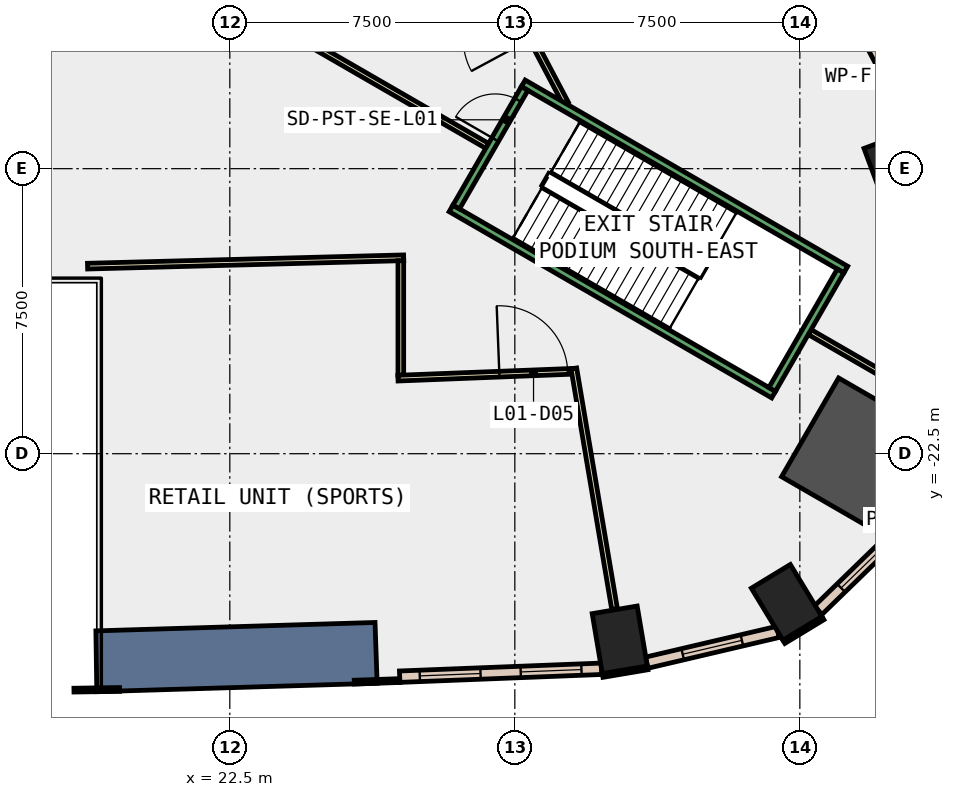
"""IFC4 building model, lengths in metres.
Left out: names, types, materials, properties, quantities, classifications, styles, units other than length and angle.
Written with IfcOpenShell. Run it as: python <this file> out.ifc"""

import sys

from ifc_helpers import new_model, si_unit, direction, frame, frame_2d, origin, origin_2d, place, context, subcontext, project, spatial, polyline, rectangle, outline, extrude, element, fill, save


model = new_model("IFC4")
c1 = context("Model", 3, precision=1e-05, world=origin(), true_north=direction((0.0, 1.0)))
c2 = subcontext(c1, "Body", "Model", "MODEL_VIEW")
j1 = project(units=[si_unit("LENGTHUNIT", "METRE"), si_unit("PLANEANGLEUNIT", "RADIAN")], contexts=[c1])
p1 = place(None, origin())
s1 = spatial("IfcSite", under=j1, at=p1, CompositionType="ELEMENT")
p2 = place(p1, origin())
s2 = spatial("IfcBuilding", under=s1, at=p2, CompositionType="ELEMENT")
p3 = place(p2, frame((0.0, 0.0, 9.0)))
s3 = spatial("IfcBuildingStorey", under=s2, at=p3, CompositionType="ELEMENT", Elevation=9.0)
for number, where, z_axis, x_axis in (
    (1, (32.761, -27.397, -0.45), (0.0, 0.0, 1.0), (0.986, 0.167, 0.0)),
    (2, (37.152, -26.411, -0.45), (0.0, 0.0, 1.0), (0.855, 0.519, 0.0)),
):
    element("IfcColumn", number, at=place(p3, frame(where, z_axis=z_axis, x_axis=x_axis)), inside=s3, PredefinedType="COLUMN", context=c2, shape_type="SweptSolid", body=[
        extrude(rectangle(XDim=1.2, YDim=1.6, at=origin_2d()), origin(), (0.0, 0.0, 1.0), 6.0),
    ])
p4 = place(p3, frame((39.069, -22.556, -0.45), z_axis=(0.0, 0.0, 1.0), x_axis=(-0.866025403784, 0.5, 0.0)))
e3 = element("IfcColumn", 3, at=p4, inside=s3, PredefinedType="COLUMN", context=c2, shape_type="SweptSolid", body=[
    extrude(rectangle(XDim=3.0, YDim=3.0, at=origin_2d()), origin(), (0.0, 0.0, 1.0), 6.0),
])
p5 = place(p3, frame((40.147, -14.751, -0.45), z_axis=(0.0, 0.0, 1.0), x_axis=(-0.348277574304, 0.937391450375, 0.0)))
e4 = element("IfcColumn", 4, at=p5, inside=s3, PredefinedType="COLUMN", context=c2, shape_type="SweptSolid", body=[
    extrude(rectangle(XDim=1.2, YDim=1.6, at=origin_2d()), origin(), (0.0, 0.0, 1.0), 6.0),
])
p6 = place(p3, frame((0.0, 0.0, -0.45)))
e5 = element("IfcWall", 5, at=p6, inside=s3, PredefinedType="SHEAR", context=c2, shape_type="SweptSolid", body=[
    extrude(outline(polyline([(19.0, -28.762), (26.377, -28.54), (26.321, -26.941), (18.976, -27.162), (19.0, -28.762)])), origin(), (0.0, 0.0, 1.0), 6.0),
])
p7 = place(p3, frame((18.399, -28.721, 0.0), z_axis=(0.0, 0.0, 1.0), x_axis=(0.999886724523, 0.015051183404, 0.0)))
e6 = element("IfcWall", 6, at=p7, inside=s3, PredefinedType="STANDARD", context=c2, shape_type="SweptSolid", body=[
    extrude(rectangle(XDim=1.2, YDim=0.1, at=frame_2d((0.6, 0.0))), origin(), (0.0, 0.0, 1.0), 5.55),
])
p8 = place(p3, frame((25.776, -28.511, 0.0), z_axis=(0.0, 0.0, 1.0), x_axis=(0.999387493042, 0.034994838926, 0.0)))
e7 = element("IfcWall", 7, at=p8, inside=s3, PredefinedType="STANDARD", context=c2, shape_type="SweptSolid", body=[
    extrude(rectangle(XDim=1.2, YDim=0.1, at=frame_2d((0.6, 0.0))), origin(), (0.0, 0.0, 1.0), 5.55),
])
p9 = place(p3, frame((32.311, -28.335, 0.0), z_axis=(0.0, 0.0, 1.0), x_axis=(0.986011774526, 0.166675674579, 0.0)))
e8 = element("IfcWall", 8, at=p9, inside=s3, PredefinedType="STANDARD", context=c2, shape_type="SweptSolid", body=[
    extrude(rectangle(XDim=1.2, YDim=0.1, at=frame_2d((0.6, 0.0))), origin(), (0.0, 0.0, 1.0), 5.55),
])
p10 = place(p3, frame((37.08, -27.449, 0.0), z_axis=(0.0, 0.0, 1.0), x_axis=(0.854716608594, 0.519094903649, 0.0)))
e9 = element("IfcWall", 9, at=p10, inside=s3, PredefinedType="STANDARD", context=c2, shape_type="SweptSolid", body=[
    extrude(rectangle(XDim=1.2, YDim=0.1, at=frame_2d((0.6, 0.0))), origin(), (0.0, 0.0, 1.0), 5.55),
])
p11 = place(p3, frame((26.97, -28.367, 0.0), z_axis=(0.0, 0.0, 1.0), x_axis=(0.999234205654, 0.039128023863, 0.0)))
e10 = element("IfcWall", 10, at=p11, inside=s3, PredefinedType="STANDARD", context=c2, shape_type="SweptSolid", body=[
    extrude(rectangle(XDim=5.316, YDim=0.3, at=frame_2d((2.658, 0.0))), origin(), (0.0, 0.0, 1.0), 5.55),
])
p12 = place(p11, frame((0.529, 0.0, 1.0)))
e11 = element("IfcOpeningElement", 11, at=p12, cuts=e10, PredefinedType="OPENING", context=c2, shape_type="SweptSolid", body=[
    extrude(rectangle(XDim=1.6, YDim=4.0, at=frame_2d((0.8, 2.0))), frame((0.0, 0.16, 0.0), z_axis=(0.0, -1.0, 0.0), x_axis=(1.0, 0.0, 0.0)), (0.0, 0.0, 1.0), 0.32),
])
p13 = place(p11, frame((3.187, 0.0, 1.0)))
e12 = element("IfcOpeningElement", 12, at=p13, cuts=e10, PredefinedType="OPENING", context=c2, shape_type="SweptSolid", body=[
    extrude(rectangle(XDim=1.6, YDim=4.0, at=frame_2d((0.8, 2.0))), frame((0.0, 0.16, 0.0), z_axis=(0.0, -1.0, 0.0), x_axis=(1.0, 0.0, 0.0)), (0.0, 0.0, 1.0), 0.32),
])
p14 = place(p3, frame((33.47, -27.999, 0.0), z_axis=(0.0, 0.0, 1.0), x_axis=(0.97357041301, 0.228387063799, 0.0)))
e13 = element("IfcWall", 13, at=p14, inside=s3, PredefinedType="STANDARD", context=c2, shape_type="SweptSolid", body=[
    extrude(rectangle(XDim=3.547, YDim=0.3, at=frame_2d((1.773, 0.0))), origin(), (0.0, 0.0, 1.0), 5.55),
])
p15 = place(p14, frame((0.973, 0.0, 1.0)))
e14 = element("IfcOpeningElement", 14, at=p15, cuts=e13, PredefinedType="OPENING", context=c2, shape_type="SweptSolid", body=[
    extrude(rectangle(XDim=1.6, YDim=4.0, at=frame_2d((0.8, 2.0))), frame((0.0, 0.16, 0.0), z_axis=(0.0, -1.0, 0.0), x_axis=(1.0, 0.0, 0.0)), (0.0, 0.0, 1.0), 0.32),
])
p16 = place(p3, frame((37.98, -26.621, 0.0), z_axis=(0.0, 0.0, 1.0), x_axis=(0.717527250225, 0.696530433782, 0.0)))
e15 = element("IfcWall", 15, at=p16, inside=s3, PredefinedType="STANDARD", context=c2, shape_type="SweptSolid", body=[
    extrude(rectangle(XDim=3.291, YDim=0.3, at=frame_2d((1.645, 0.0))), origin(), (0.0, 0.0, 1.0), 5.55),
])
p17 = place(p16, frame((0.845, 0.0, 1.0)))
e16 = element("IfcOpeningElement", 16, at=p17, cuts=e15, PredefinedType="OPENING", context=c2, shape_type="SweptSolid", body=[
    extrude(rectangle(XDim=1.6, YDim=4.0, at=frame_2d((0.8, 2.0))), frame((0.0, 0.16, 0.0), z_axis=(0.0, -1.0, 0.0), x_axis=(1.0, 0.0, 0.0)), (0.0, 0.0, 1.0), 0.32),
])
p18 = place(p3, frame((40.568, -13.956, 0.0), z_axis=(0.0, 0.0, 1.0), x_axis=(-0.466125129602, 0.884718804792, 0.0)))
e17 = element("IfcWall", 17, at=p18, inside=s3, PredefinedType="STANDARD", context=c2, shape_type="SweptSolid", body=[
    extrude(rectangle(XDim=6.164, YDim=0.3, at=frame_2d((3.082, 0.0))), origin(), (0.0, 0.0, 1.0), 5.55),
])
p19 = place(p18, frame((0.541, 0.0, 1.0)))
e18 = element("IfcOpeningElement", 18, at=p19, cuts=e17, PredefinedType="OPENING", context=c2, shape_type="SweptSolid", body=[
    extrude(rectangle(XDim=2.0, YDim=4.0, at=frame_2d((1.0, 2.0))), frame((0.0, 0.16, 0.0), z_axis=(0.0, -1.0, 0.0), x_axis=(1.0, 0.0, 0.0)), (0.0, 0.0, 1.0), 0.32),
])
p20 = place(p18, frame((3.623, 0.0, 1.0)))
e19 = element("IfcOpeningElement", 19, at=p20, cuts=e17, PredefinedType="OPENING", context=c2, shape_type="SweptSolid", body=[
    extrude(rectangle(XDim=2.0, YDim=4.0, at=frame_2d((1.0, 2.0))), frame((0.0, 0.16, 0.0), z_axis=(0.0, -1.0, 0.0), x_axis=(1.0, 0.0, 0.0)), (0.0, 0.0, 1.0), 0.32),
])
p21 = place(p3, frame((18.757, -17.565, 0.0), z_axis=(0.0, 0.0, 1.0), x_axis=(0.999650499667, 0.026436310543, 0.0)))
e20 = element("IfcWall", 20, at=p21, inside=s3, PredefinedType="PARTITIONING", context=c2, shape_type="SweptSolid", body=[
    extrude(rectangle(XDim=8.321, YDim=0.15, at=frame_2d((4.16, 0.0))), origin(), (0.0, 0.0, 1.0), 5.55),
])
p22 = place(p3, frame((27.0, -17.422, 0.0), z_axis=(0.0, 0.0, 1.0), x_axis=(0.0, -1.0, 0.0)))
e21 = element("IfcWall", 21, at=p22, inside=s3, PredefinedType="PARTITIONING", context=c2, shape_type="SweptSolid", body=[
    extrude(rectangle(XDim=3.012, YDim=0.15, at=frame_2d((1.506, 0.0))), origin(), (0.0, 0.0, 1.0), 5.55),
])
p23 = place(p3, frame((26.925, -20.512, 0.0), z_axis=(0.0, 0.0, 1.0), x_axis=(0.99923281192, 0.039163600211, 0.0)))
e22 = element("IfcWall", 22, at=p23, inside=s3, PredefinedType="PARTITIONING", context=c2, shape_type="SweptSolid", body=[
    extrude(rectangle(XDim=4.569, YDim=0.15, at=frame_2d((2.285, 0.0))), origin(), (0.0, 0.0, 1.0), 5.55),
])
p24 = place(p23, frame((2.67, 0.0, 0.0)))
e23 = element("IfcOpeningElement", 23, at=p24, cuts=e22, PredefinedType="OPENING", context=c2, shape_type="SweptSolid", body=[
    extrude(rectangle(XDim=1.8, YDim=2.1, at=frame_2d((0.9, 1.05))), frame((0.0, 0.085, 0.0), z_axis=(0.0, -1.0, 0.0), x_axis=(1.0, 0.0, 0.0)), (0.0, 0.0, 1.0), 0.17),
])
p25 = place(p3, frame((31.553, -20.256, 0.0), z_axis=(0.0, 0.0, 1.0), x_axis=(0.16693222012, -0.985968373674, 0.0)))
e24 = element("IfcWall", 24, at=p25, inside=s3, PredefinedType="PARTITIONING", context=c2, shape_type="SweptSolid", body=[
    extrude(rectangle(XDim=6.422, YDim=0.15, at=frame_2d((3.211, 0.0))), origin(), (0.0, 0.0, 1.0), 5.55),
])
p26 = place(p3, frame((41.427, -21.418, 0.0), z_axis=(0.0, 0.0, 1.0), x_axis=(-0.866003200133, 0.500038455881, 0.0)))
e25 = element("IfcWall", 25, at=p26, inside=s3, PredefinedType="PARTITIONING", context=c2, shape_type="SweptSolid", body=[
    extrude(rectangle(XDim=4.236, YDim=0.15, at=frame_2d((2.118, 0.0))), origin(), (0.0, 0.0, 1.0), 5.55),
])
p27 = place(p3, frame((31.341, -13.285, 0.0), z_axis=(0.0, 0.0, 1.0), x_axis=(-0.466164290517, 0.884698171269, 0.0)))
e26 = element("IfcWall", 26, at=p27, inside=s3, PredefinedType="PARTITIONING", context=c2, shape_type="SweptSolid", body=[
    extrude(rectangle(XDim=1.83, YDim=0.15, at=frame_2d((0.915, 0.0))), origin(), (0.0, 0.0, 1.0), 5.55),
])
p28 = place(p3, frame((10.392, -3.5, 0.0), z_axis=(0.0, 0.0, 1.0), x_axis=(0.866033409894, -0.499986132754, 0.0)))
e27 = element("IfcWall", 27, at=p28, inside=s3, PredefinedType="PARTITIONING", context=c2, shape_type="SweptSolid", body=[
    extrude(rectangle(XDim=21.8, YDim=0.15, at=frame_2d((10.9, 0.0))), origin(), (0.0, 0.0, 1.0), 5.55),
])
p29 = place(p28, frame((10.08, 0.0, 0.0)))
e28 = element("IfcOpeningElement", 28, at=p29, cuts=e27, PredefinedType="OPENING", context=c2, shape_type="SweptSolid", body=[
    extrude(rectangle(XDim=1.8, YDim=2.1, at=frame_2d((0.9, 1.05))), frame((0.0, 0.085, 0.0), z_axis=(0.0, -1.0, 0.0), x_axis=(1.0, 0.0, 0.0)), (0.0, 0.0, 1.0), 0.17),
])
for number, where, z_axis, x_axis in (
    (29, (28.322, -16.045, 0.0), (0.0, 0.0, 1.0), (0.866, -0.5, 0.0)),
    (30, (30.222, -12.755, 0.0), (0.0, 0.0, 1.0), (0.866, -0.5, 0.0)),
):
    element("IfcWall", number, at=place(p3, frame(where, z_axis=z_axis, x_axis=x_axis)), inside=s3, PredefinedType="STANDARD", context=c2, shape_type="SweptSolid", body=[
        extrude(rectangle(XDim=9.8, YDim=0.2, at=frame_2d((4.9, 0.0))), origin(), (0.0, 0.0, 1.0), 5.55),
    ])
p30 = place(p3, frame((28.458, -16.009, 0.0), z_axis=(0.0, 0.0, 1.0), x_axis=(0.499982693035, 0.866035395735, 0.0)))
e31 = element("IfcWall", 31, at=p30, inside=s3, PredefinedType="STANDARD", context=c2, shape_type="SweptSolid", body=[
    extrude(rectangle(XDim=3.6, YDim=0.2, at=frame_2d((1.8, 0.0))), origin(), (0.0, 0.0, 1.0), 5.55),
])
p31 = place(p30, frame((2.05, 0.0, 0.0)))
e32 = element("IfcOpeningElement", 32, at=p31, cuts=e31, PredefinedType="OPENING", context=c2, shape_type="SweptSolid", body=[
    extrude(rectangle(XDim=1.2, YDim=2.2, at=frame_2d((0.6, 1.1))), frame((0.0, 0.11, 0.0), z_axis=(0.0, -1.0, 0.0), x_axis=(1.0, 0.0, 0.0)), (0.0, 0.0, 1.0), 0.22),
])
p32 = place(p3, frame((36.772, -20.809, 0.0), z_axis=(0.0, 0.0, 1.0), x_axis=(0.49995333141, 0.866052346231, 0.0)))
e33 = element("IfcWall", 33, at=p32, inside=s3, PredefinedType="STANDARD", context=c2, shape_type="SweptSolid", body=[
    extrude(rectangle(XDim=3.6, YDim=0.2, at=frame_2d((1.8, 0.0))), origin(), (0.0, 0.0, 1.0), 5.55),
])
p33 = place(p12, origin())
e34 = element("IfcWindow", 34, at=p33, inside=s3, PartitioningType="SINGLE_PANEL", PredefinedType="WINDOW", context=c2, shape_type="SweptSolid", body=[
    extrude(rectangle(XDim=1.6, YDim=4.0, at=frame_2d((0.8, 2.0))), frame((0.0, 0.03, 0.0), z_axis=(0.0, -1.0, 0.0), x_axis=(1.0, 0.0, 0.0)), (0.0, 0.0, 1.0), 0.06),
])
fill(e11, e34)
p34 = place(p13, origin())
e35 = element("IfcWindow", 35, at=p34, inside=s3, PartitioningType="SINGLE_PANEL", PredefinedType="WINDOW", context=c2, shape_type="SweptSolid", body=[
    extrude(rectangle(XDim=1.6, YDim=4.0, at=frame_2d((0.8, 2.0))), frame((0.0, 0.03, 0.0), z_axis=(0.0, -1.0, 0.0), x_axis=(1.0, 0.0, 0.0)), (0.0, 0.0, 1.0), 0.06),
])
fill(e12, e35)
p35 = place(p15, origin())
e36 = element("IfcWindow", 36, at=p35, inside=s3, PartitioningType="SINGLE_PANEL", PredefinedType="WINDOW", context=c2, shape_type="SweptSolid", body=[
    extrude(rectangle(XDim=1.6, YDim=4.0, at=frame_2d((0.8, 2.0))), frame((0.0, 0.03, 0.0), z_axis=(0.0, -1.0, 0.0), x_axis=(1.0, 0.0, 0.0)), (0.0, 0.0, 1.0), 0.06),
])
fill(e14, e36)
p36 = place(p17, origin())
e37 = element("IfcWindow", 37, at=p36, inside=s3, PartitioningType="SINGLE_PANEL", PredefinedType="WINDOW", context=c2, shape_type="SweptSolid", body=[
    extrude(rectangle(XDim=1.6, YDim=4.0, at=frame_2d((0.8, 2.0))), frame((0.0, 0.03, 0.0), z_axis=(0.0, -1.0, 0.0), x_axis=(1.0, 0.0, 0.0)), (0.0, 0.0, 1.0), 0.06),
])
fill(e16, e37)
p37 = place(p19, origin())
e38 = element("IfcWindow", 38, at=p37, inside=s3, PartitioningType="SINGLE_PANEL", PredefinedType="WINDOW", context=c2, shape_type="SweptSolid", body=[
    extrude(rectangle(XDim=2.0, YDim=4.0, at=frame_2d((1.0, 2.0))), frame((0.0, 0.03, 0.0), z_axis=(0.0, -1.0, 0.0), x_axis=(1.0, 0.0, 0.0)), (0.0, 0.0, 1.0), 0.06),
])
fill(e18, e38)
p38 = place(p24, origin())
e39 = element("IfcDoor", 39, at=p38, inside=s3, OperationType="DOUBLE_DOOR_SINGLE_SWING", PredefinedType="DOOR", context=c2, shape_type="SweptSolid", body=[
    extrude(rectangle(XDim=1.8, YDim=2.1, at=frame_2d((0.9, 1.05))), frame((0.0, 0.025, 0.0), z_axis=(0.0, -1.0, 0.0), x_axis=(1.0, 0.0, 0.0)), (0.0, 0.0, 1.0), 0.05),
])
fill(e23, e39)
p39 = place(p31, origin())
e40 = element("IfcDoor", 40, at=p39, inside=s3, OperationType="SINGLE_SWING_LEFT", PredefinedType="DOOR", context=c2, shape_type="SweptSolid", body=[
    extrude(rectangle(XDim=1.2, YDim=2.2, at=frame_2d((0.6, 1.1))), frame((0.0, 0.025, 0.0), z_axis=(0.0, -1.0, 0.0), x_axis=(1.0, 0.0, 0.0)), (0.0, 0.0, 1.0), 0.05),
])
fill(e32, e40)
save(model, sys.argv[1])
